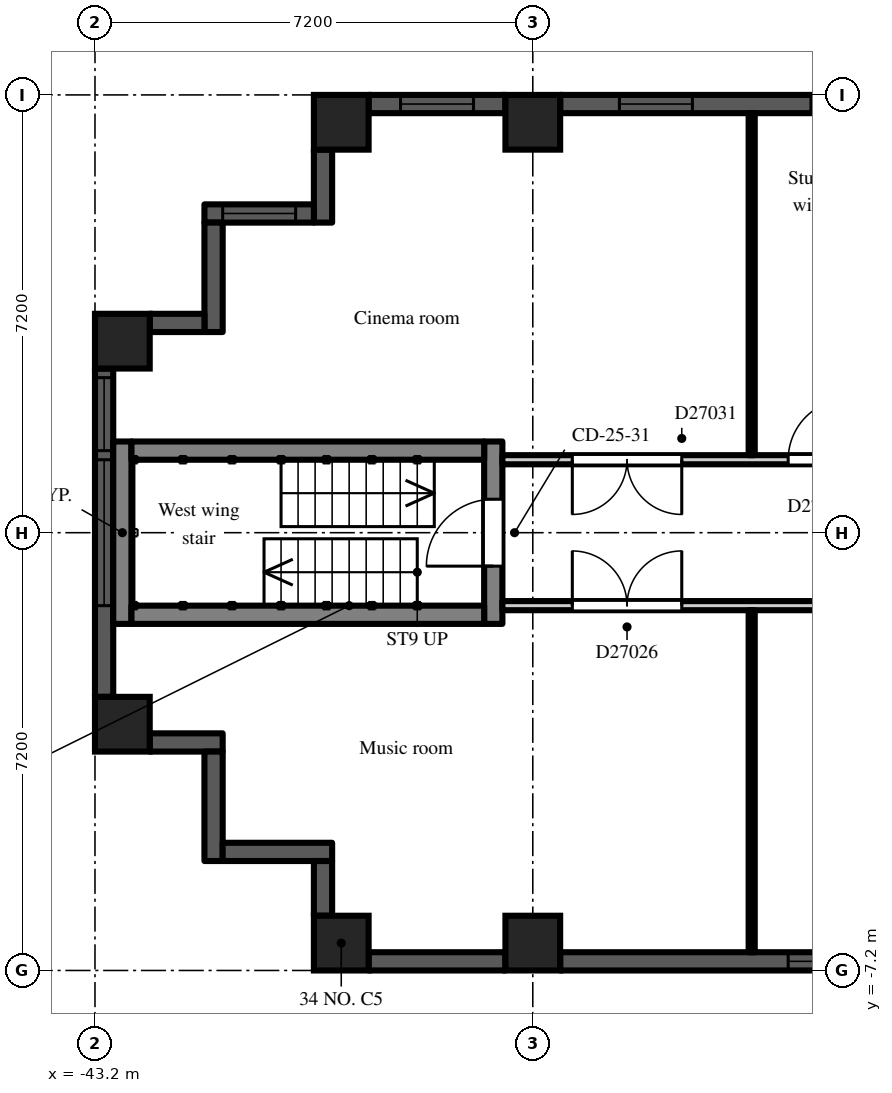
"""IFC4 building model, lengths in metres.
Left out: names, types, materials, properties, quantities, classifications, styles, units other than length and angle.
Written with IfcOpenShell. Run it as: python <this file> out.ifc"""

import sys

from ifc_helpers import new_model, si_unit, direction, frame, frame_2d, origin, origin_2d, place, context, subcontext, project, spatial, rectangle, extrude, element, fill, save


model = new_model("IFC4")
c1 = context("Model", 3, precision=1e-05, world=origin(), true_north=direction((0.0, 1.0)))
c2 = subcontext(c1, "Body", "Model", "MODEL_VIEW")
j1 = project(units=[si_unit("LENGTHUNIT", "METRE"), si_unit("PLANEANGLEUNIT", "RADIAN")], contexts=[c1])
p1 = place(None, origin())
s1 = spatial("IfcSite", under=j1, at=p1, CompositionType="ELEMENT")
p2 = place(p1, origin())
s2 = spatial("IfcBuilding", under=s1, at=p2, CompositionType="ELEMENT")
p3 = place(p2, frame((0.0, 0.0, 191.7)))
s3 = spatial("IfcBuildingStorey", under=s2, at=p3, CompositionType="ELEMENT", Elevation=191.7)
for number, where, z_axis, x_axis in (
    (1, (-42.75, -3.15, 0.0), (0.0, 0.0, 1.0), (1.0, 0.0, 0.0)),
    (2, (-42.75, 3.15, 0.0), (0.0, 0.0, 1.0), (1.0, 0.0, 0.0)),
    (3, (-39.15, -6.75, 0.0), (0.0, 0.0, 1.0), (1.0, 0.0, 0.0)),
    (4, (-39.15, 6.75, 0.0), (0.0, 0.0, 1.0), (1.0, 0.0, 0.0)),
    (5, (-36.0, -6.75, 0.0), (0.0, 0.0, 1.0), (1.0, 0.0, 0.0)),
    (6, (-36.0, 6.75, 0.0), (0.0, 0.0, 1.0), (1.0, 0.0, 0.0)),
):
    element("IfcColumn", number, at=place(p3, frame(where, z_axis=z_axis, x_axis=x_axis)), inside=s3, PredefinedType="COLUMN", context=c2, shape_type="SweptSolid", body=[
        extrude(rectangle(XDim=0.9, YDim=0.9, at=origin_2d()), origin(), (0.0, 0.0, 1.0), 3.0),
    ])
p4 = place(p3, frame((-29.25, 7.05, 0.0), z_axis=(0.0, 0.0, 1.0), x_axis=(-1.0, 0.0, 0.0)))
e7 = element("IfcWall", 7, at=p4, inside=s3, PredefinedType="SOLIDWALL", context=c2, shape_type="SweptSolid", body=[
    extrude(rectangle(XDim=6.3, YDim=0.3, at=frame_2d((3.15, 0.0))), origin(), (0.0, 0.0, 1.0), 2.3),
])
p5 = place(p4, frame((0.975, 0.0, 0.2)))
e8 = element("IfcOpeningElement", 8, at=p5, cuts=e7, PredefinedType="OPENING", context=c2, shape_type="SweptSolid", body=[
    extrude(rectangle(XDim=1.2, YDim=1.85, at=frame_2d((0.6, 0.925))), frame((0.0, 0.16, 0.0), z_axis=(0.0, -1.0, 0.0), x_axis=(1.0, 0.0, 0.0)), (0.0, 0.0, 1.0), 0.32),
])
p6 = place(p4, frame((4.125, 0.0, 0.2)))
e9 = element("IfcOpeningElement", 9, at=p6, cuts=e7, PredefinedType="OPENING", context=c2, shape_type="SweptSolid", body=[
    extrude(rectangle(XDim=1.2, YDim=1.85, at=frame_2d((0.6, 0.925))), frame((0.0, 0.16, 0.0), z_axis=(0.0, -1.0, 0.0), x_axis=(1.0, 0.0, 0.0)), (0.0, 0.0, 1.0), 0.32),
])
p7 = place(p3, frame((-36.45, 7.05, 0.0), z_axis=(0.0, 0.0, 1.0), x_axis=(-1.0, 0.0, 0.0)))
e10 = element("IfcWall", 10, at=p7, inside=s3, PredefinedType="SOLIDWALL", context=c2, shape_type="SweptSolid", body=[
    extrude(rectangle(XDim=2.25, YDim=0.3, at=frame_2d((1.125, 0.0))), origin(), (0.0, 0.0, 1.0), 2.3),
])
p8 = place(p7, frame((0.525, 0.0, 0.2)))
e11 = element("IfcOpeningElement", 11, at=p8, cuts=e10, PredefinedType="OPENING", context=c2, shape_type="SweptSolid", body=[
    extrude(rectangle(XDim=1.2, YDim=1.85, at=frame_2d((0.6, 0.925))), frame((0.0, 0.16, 0.0), z_axis=(0.0, -1.0, 0.0), x_axis=(1.0, 0.0, 0.0)), (0.0, 0.0, 1.0), 0.32),
])
p9 = place(p3, frame((-39.45, 6.3, 0.0), z_axis=(0.0, 0.0, 1.0), x_axis=(0.0, -1.0, 0.0)))
e12 = element("IfcWall", 12, at=p9, inside=s3, PredefinedType="SOLIDWALL", context=c2, shape_type="SweptSolid", body=[
    extrude(rectangle(XDim=1.2, YDim=0.3, at=frame_2d((0.6, 0.0))), origin(), (0.0, 0.0, 1.0), 2.55),
])
p10 = place(p3, frame((-39.6, 5.25, 0.0), z_axis=(0.0, 0.0, 1.0), x_axis=(-1.0, 0.0, 0.0)))
e13 = element("IfcWall", 13, at=p10, inside=s3, PredefinedType="SOLIDWALL", context=c2, shape_type="SweptSolid", body=[
    extrude(rectangle(XDim=1.8, YDim=0.3, at=frame_2d((0.9, 0.0))), origin(), (0.0, 0.0, 1.0), 2.55),
])
p11 = place(p10, frame((0.3, 0.0, 0.2)))
e14 = element("IfcOpeningElement", 14, at=p11, cuts=e13, PredefinedType="OPENING", context=c2, shape_type="SweptSolid", body=[
    extrude(rectangle(XDim=1.2, YDim=1.85, at=frame_2d((0.6, 0.925))), frame((0.0, 0.16, 0.0), z_axis=(0.0, -1.0, 0.0), x_axis=(1.0, 0.0, 0.0)), (0.0, 0.0, 1.0), 0.32),
])
p12 = place(p3, frame((-41.25, 5.1, 0.0), z_axis=(0.0, 0.0, 1.0), x_axis=(0.0, -1.0, 0.0)))
e15 = element("IfcWall", 15, at=p12, inside=s3, PredefinedType="SOLIDWALL", context=c2, shape_type="SweptSolid", body=[
    extrude(rectangle(XDim=1.8, YDim=0.3, at=frame_2d((0.9, 0.0))), origin(), (0.0, 0.0, 1.0), 2.55),
])
p13 = place(p3, frame((-41.4, 3.45, 0.0), z_axis=(0.0, 0.0, 1.0), x_axis=(-1.0, 0.0, 0.0)))
e16 = element("IfcWall", 16, at=p13, inside=s3, PredefinedType="SOLIDWALL", context=c2, shape_type="SweptSolid", body=[
    extrude(rectangle(XDim=0.9, YDim=0.3, at=frame_2d((0.45, 0.0))), origin(), (0.0, 0.0, 1.0), 2.55),
])
p14 = place(p3, frame((-43.05, 2.7, 0.0), z_axis=(0.0, 0.0, 1.0), x_axis=(0.0, -1.0, 0.0)))
e17 = element("IfcWall", 17, at=p14, inside=s3, PredefinedType="SOLIDWALL", context=c2, shape_type="SweptSolid", body=[
    extrude(rectangle(XDim=5.4, YDim=0.3, at=frame_2d((2.7, 0.0))), origin(), (0.0, 0.0, 1.0), 2.3),
])
p15 = place(p14, frame((1.5, 0.0, 0.2)))
e18 = element("IfcOpeningElement", 18, at=p15, cuts=e17, PredefinedType="OPENING", context=c2, shape_type="SweptSolid", body=[
    extrude(rectangle(XDim=2.4, YDim=1.85, at=frame_2d((1.2, 0.925))), frame((0.0, 0.16, 0.0), z_axis=(0.0, -1.0, 0.0), x_axis=(1.0, 0.0, 0.0)), (0.0, 0.0, 1.0), 0.32),
])
p16 = place(p14, frame((0.15, 0.0, 0.2)))
e19 = element("IfcOpeningElement", 19, at=p16, cuts=e17, PredefinedType="OPENING", context=c2, shape_type="SweptSolid", body=[
    extrude(rectangle(XDim=1.2, YDim=1.85, at=frame_2d((0.6, 0.925))), frame((0.0, 0.16, 0.0), z_axis=(0.0, -1.0, 0.0), x_axis=(1.0, 0.0, 0.0)), (0.0, 0.0, 1.0), 0.32),
])
p17 = place(p3, frame((-42.3, -3.45, 0.0), z_axis=(0.0, 0.0, 1.0), x_axis=(1.0, 0.0, 0.0)))
e20 = element("IfcWall", 20, at=p17, inside=s3, PredefinedType="SOLIDWALL", context=c2, shape_type="SweptSolid", body=[
    extrude(rectangle(XDim=1.2, YDim=0.3, at=frame_2d((0.6, 0.0))), origin(), (0.0, 0.0, 1.0), 2.55),
])
p18 = place(p3, frame((-41.25, -3.6, 0.0), z_axis=(0.0, 0.0, 1.0), x_axis=(0.0, -1.0, 0.0)))
e21 = element("IfcWall", 21, at=p18, inside=s3, PredefinedType="SOLIDWALL", context=c2, shape_type="SweptSolid", body=[
    extrude(rectangle(XDim=1.8, YDim=0.3, at=frame_2d((0.9, 0.0))), origin(), (0.0, 0.0, 1.0), 2.55),
])
p19 = place(p3, frame((-41.1, -5.25, 0.0), z_axis=(0.0, 0.0, 1.0), x_axis=(1.0, 0.0, 0.0)))
e22 = element("IfcWall", 22, at=p19, inside=s3, PredefinedType="SOLIDWALL", context=c2, shape_type="SweptSolid", body=[
    extrude(rectangle(XDim=1.8, YDim=0.3, at=frame_2d((0.9, 0.0))), origin(), (0.0, 0.0, 1.0), 2.55),
])
p20 = place(p3, frame((-39.45, -5.4, 0.0), z_axis=(0.0, 0.0, 1.0), x_axis=(0.0, -1.0, 0.0)))
e23 = element("IfcWall", 23, at=p20, inside=s3, PredefinedType="SOLIDWALL", context=c2, shape_type="SweptSolid", body=[
    extrude(rectangle(XDim=0.9, YDim=0.3, at=frame_2d((0.45, 0.0))), origin(), (0.0, 0.0, 1.0), 2.55),
])
p21 = place(p3, frame((-38.7, -7.05, 0.0), z_axis=(0.0, 0.0, 1.0), x_axis=(1.0, 0.0, 0.0)))
e24 = element("IfcWall", 24, at=p21, inside=s3, PredefinedType="SOLIDWALL", context=c2, shape_type="SweptSolid", body=[
    extrude(rectangle(XDim=2.25, YDim=0.3, at=frame_2d((1.125, 0.0))), origin(), (0.0, 0.0, 1.0), 2.3),
])
p22 = place(p3, frame((-35.55, -7.05, 0.0), z_axis=(0.0, 0.0, 1.0), x_axis=(1.0, 0.0, 0.0)))
e25 = element("IfcWall", 25, at=p22, inside=s3, PredefinedType="SOLIDWALL", context=c2, shape_type="SweptSolid", body=[
    extrude(rectangle(XDim=6.3, YDim=0.3, at=frame_2d((3.15, 0.0))), origin(), (0.0, 0.0, 1.0), 2.3),
])
p23 = place(p22, frame((3.75, 0.0, 0.2)))
e26 = element("IfcOpeningElement", 26, at=p23, cuts=e25, PredefinedType="OPENING", context=c2, shape_type="SweptSolid", body=[
    extrude(rectangle(XDim=2.4, YDim=1.85, at=frame_2d((1.2, 0.925))), frame((0.0, 0.16, 0.0), z_axis=(0.0, -1.0, 0.0), x_axis=(1.0, 0.0, 0.0)), (0.0, 0.0, 1.0), 0.32),
])
p24 = place(p3, frame((-36.65, -1.5, 0.0), z_axis=(0.0, 0.0, 1.0), x_axis=(0.0, 1.0, 0.0)))
e27 = element("IfcWall", 27, at=p24, inside=s3, PredefinedType="SHEAR", context=c2, shape_type="SweptSolid", body=[
    extrude(rectangle(XDim=3.0, YDim=0.3, at=frame_2d((1.5, 0.0))), origin(), (0.0, 0.0, 1.0), 2.55),
])
p25 = place(p24, frame((0.95, 0.0, 0.0)))
e28 = element("IfcOpeningElement", 28, at=p25, cuts=e27, PredefinedType="OPENING", context=c2, shape_type="SweptSolid", body=[
    extrude(rectangle(XDim=1.1, YDim=2.1, at=frame_2d((0.55, 1.05))), frame((0.0, 0.16, 0.0), z_axis=(0.0, -1.0, 0.0), x_axis=(1.0, 0.0, 0.0)), (0.0, 0.0, 1.0), 0.32),
])
p26 = place(p3, frame((-42.75, -1.5, 0.0), z_axis=(0.0, 0.0, 1.0), x_axis=(0.0, 1.0, 0.0)))
e29 = element("IfcWall", 29, at=p26, inside=s3, PredefinedType="SHEAR", context=c2, shape_type="SweptSolid", body=[
    extrude(rectangle(XDim=3.0, YDim=0.3, at=frame_2d((1.5, 0.0))), origin(), (0.0, 0.0, 1.0), 2.55),
])
for number, where, z_axis, x_axis in (
    (30, (-36.8, -1.35, 0.0), (0.0, 0.0, 1.0), (-1.0, 0.0, 0.0)),
    (31, (-36.8, 1.35, 0.0), (0.0, 0.0, 1.0), (-1.0, 0.0, 0.0)),
):
    element("IfcWall", number, at=place(p3, frame(where, z_axis=z_axis, x_axis=x_axis)), inside=s3, PredefinedType="SHEAR", context=c2, shape_type="SweptSolid", body=[
        extrude(rectangle(XDim=5.8, YDim=0.3, at=frame_2d((2.9, 0.0))), origin(), (0.0, 0.0, 1.0), 2.55),
    ])
p27 = place(p3, frame((-36.5, -1.2, 0.0), z_axis=(0.0, 0.0, 1.0), x_axis=(1.0, 0.0, 0.0)))
e32 = element("IfcWall", 32, at=p27, inside=s3, PredefinedType="PARTITIONING", context=c2, shape_type="SweptSolid", body=[
    extrude(rectangle(XDim=14.9, YDim=0.15, at=frame_2d((7.45, 0.0))), origin(), (0.0, 0.0, 1.0), 2.55),
])
p28 = place(p27, frame((12.65, 0.0, 0.0)))
e33 = element("IfcOpeningElement", 33, at=p28, cuts=e32, PredefinedType="OPENING", context=c2, shape_type="SweptSolid", body=[
    extrude(rectangle(XDim=0.9, YDim=2.1, at=frame_2d((0.45, 1.05))), frame((0.0, 0.085, 0.0), z_axis=(0.0, -1.0, 0.0), x_axis=(1.0, 0.0, 0.0)), (0.0, 0.0, 1.0), 0.17),
])
p29 = place(p27, frame((9.05, 0.0, 0.0)))
e34 = element("IfcOpeningElement", 34, at=p29, cuts=e32, PredefinedType="OPENING", context=c2, shape_type="SweptSolid", body=[
    extrude(rectangle(XDim=0.9, YDim=2.1, at=frame_2d((0.45, 1.05))), frame((0.0, 0.085, 0.0), z_axis=(0.0, -1.0, 0.0), x_axis=(1.0, 0.0, 0.0)), (0.0, 0.0, 1.0), 0.17),
])
p30 = place(p27, frame((5.45, 0.0, 0.0)))
e35 = element("IfcOpeningElement", 35, at=p30, cuts=e32, PredefinedType="OPENING", context=c2, shape_type="SweptSolid", body=[
    extrude(rectangle(XDim=0.9, YDim=2.1, at=frame_2d((0.45, 1.05))), frame((0.0, 0.085, 0.0), z_axis=(0.0, -1.0, 0.0), x_axis=(1.0, 0.0, 0.0)), (0.0, 0.0, 1.0), 0.17),
])
p31 = place(p27, frame((1.15, 0.0, 0.0)))
e36 = element("IfcOpeningElement", 36, at=p31, cuts=e32, PredefinedType="OPENING", context=c2, shape_type="SweptSolid", body=[
    extrude(rectangle(XDim=1.8, YDim=2.1, at=frame_2d((0.9, 1.05))), frame((0.0, 0.085, 0.0), z_axis=(0.0, -1.0, 0.0), x_axis=(1.0, 0.0, 0.0)), (0.0, 0.0, 1.0), 0.17),
])
p32 = place(p3, frame((-36.5, 1.2, 0.0), z_axis=(0.0, 0.0, 1.0), x_axis=(1.0, 0.0, 0.0)))
e37 = element("IfcWall", 37, at=p32, inside=s3, PredefinedType="PARTITIONING", context=c2, shape_type="SweptSolid", body=[
    extrude(rectangle(XDim=14.9, YDim=0.15, at=frame_2d((7.45, 0.0))), origin(), (0.0, 0.0, 1.0), 2.55),
])
p33 = place(p32, frame((10.1, 0.0, 0.0)))
e38 = element("IfcOpeningElement", 38, at=p33, cuts=e37, PredefinedType="OPENING", context=c2, shape_type="SweptSolid", body=[
    extrude(rectangle(XDim=1.0, YDim=2.1, at=frame_2d((0.5, 1.05))), frame((0.0, 0.085, 0.0), z_axis=(0.0, -1.0, 0.0), x_axis=(1.0, 0.0, 0.0)), (0.0, 0.0, 1.0), 0.17),
])
p34 = place(p32, frame((4.7, 0.0, 0.0)))
e39 = element("IfcOpeningElement", 39, at=p34, cuts=e37, PredefinedType="OPENING", context=c2, shape_type="SweptSolid", body=[
    extrude(rectangle(XDim=1.0, YDim=2.1, at=frame_2d((0.5, 1.05))), frame((0.0, 0.085, 0.0), z_axis=(0.0, -1.0, 0.0), x_axis=(1.0, 0.0, 0.0)), (0.0, 0.0, 1.0), 0.17),
])
p35 = place(p32, frame((1.15, 0.0, 0.0)))
e40 = element("IfcOpeningElement", 40, at=p35, cuts=e37, PredefinedType="OPENING", context=c2, shape_type="SweptSolid", body=[
    extrude(rectangle(XDim=1.8, YDim=2.1, at=frame_2d((0.9, 1.05))), frame((0.0, 0.085, 0.0), z_axis=(0.0, -1.0, 0.0), x_axis=(1.0, 0.0, 0.0)), (0.0, 0.0, 1.0), 0.17),
])
for number, where, z_axis, x_axis in (
    (41, (-32.4, -6.9, 0.0), (0.0, 0.0, 1.0), (0.0, 1.0, 0.0)),
    (42, (-32.4, 1.275, 0.0), (0.0, 0.0, 1.0), (0.0, 1.0, 0.0)),
):
    element("IfcWall", number, at=place(p3, frame(where, z_axis=z_axis, x_axis=x_axis)), inside=s3, PredefinedType="PARTITIONING", context=c2, shape_type="SweptSolid", body=[
        extrude(rectangle(XDim=5.625, YDim=0.1, at=frame_2d((2.812, 0.0))), origin(), (0.0, 0.0, 1.0), 2.55),
    ])
p36 = place(p5, origin())
e43 = element("IfcWindow", 43, at=p36, inside=s3, PartitioningType="SINGLE_PANEL", PredefinedType="WINDOW", context=c2, shape_type="SweptSolid", body=[
    extrude(rectangle(XDim=1.2, YDim=1.85, at=frame_2d((0.6, 0.925))), frame((0.0, 0.03, 0.0), z_axis=(0.0, -1.0, 0.0), x_axis=(1.0, 0.0, 0.0)), (0.0, 0.0, 1.0), 0.06),
])
fill(e8, e43)
p37 = place(p6, origin())
e44 = element("IfcWindow", 44, at=p37, inside=s3, PartitioningType="SINGLE_PANEL", PredefinedType="WINDOW", context=c2, shape_type="SweptSolid", body=[
    extrude(rectangle(XDim=1.2, YDim=1.85, at=frame_2d((0.6, 0.925))), frame((0.0, 0.03, 0.0), z_axis=(0.0, -1.0, 0.0), x_axis=(1.0, 0.0, 0.0)), (0.0, 0.0, 1.0), 0.06),
])
fill(e9, e44)
p38 = place(p8, origin())
e45 = element("IfcWindow", 45, at=p38, inside=s3, PartitioningType="SINGLE_PANEL", PredefinedType="WINDOW", context=c2, shape_type="SweptSolid", body=[
    extrude(rectangle(XDim=1.2, YDim=1.85, at=frame_2d((0.6, 0.925))), frame((0.0, 0.03, 0.0), z_axis=(0.0, -1.0, 0.0), x_axis=(1.0, 0.0, 0.0)), (0.0, 0.0, 1.0), 0.06),
])
fill(e11, e45)
p39 = place(p11, origin())
e46 = element("IfcWindow", 46, at=p39, inside=s3, PartitioningType="SINGLE_PANEL", PredefinedType="WINDOW", context=c2, shape_type="SweptSolid", body=[
    extrude(rectangle(XDim=1.2, YDim=1.85, at=frame_2d((0.6, 0.925))), frame((0.0, 0.03, 0.0), z_axis=(0.0, -1.0, 0.0), x_axis=(1.0, 0.0, 0.0)), (0.0, 0.0, 1.0), 0.06),
])
fill(e14, e46)
p40 = place(p15, origin())
e47 = element("IfcWindow", 47, at=p40, inside=s3, PartitioningType="SINGLE_PANEL", PredefinedType="WINDOW", context=c2, shape_type="SweptSolid", body=[
    extrude(rectangle(XDim=2.4, YDim=1.85, at=frame_2d((1.2, 0.925))), frame((0.0, 0.03, 0.0), z_axis=(0.0, -1.0, 0.0), x_axis=(1.0, 0.0, 0.0)), (0.0, 0.0, 1.0), 0.06),
])
fill(e18, e47)
p41 = place(p16, origin())
e48 = element("IfcWindow", 48, at=p41, inside=s3, PartitioningType="SINGLE_PANEL", PredefinedType="WINDOW", context=c2, shape_type="SweptSolid", body=[
    extrude(rectangle(XDim=1.2, YDim=1.85, at=frame_2d((0.6, 0.925))), frame((0.0, 0.03, 0.0), z_axis=(0.0, -1.0, 0.0), x_axis=(1.0, 0.0, 0.0)), (0.0, 0.0, 1.0), 0.06),
])
fill(e19, e48)
p42 = place(p23, origin())
e49 = element("IfcWindow", 49, at=p42, inside=s3, PartitioningType="SINGLE_PANEL", PredefinedType="WINDOW", context=c2, shape_type="SweptSolid", body=[
    extrude(rectangle(XDim=2.4, YDim=1.85, at=frame_2d((1.2, 0.925))), frame((0.0, 0.03, 0.0), z_axis=(0.0, -1.0, 0.0), x_axis=(1.0, 0.0, 0.0)), (0.0, 0.0, 1.0), 0.06),
])
fill(e26, e49)
p43 = place(p25, origin())
e50 = element("IfcDoor", 50, at=p43, inside=s3, OperationType="SINGLE_SWING_LEFT", PredefinedType="DOOR", context=c2, shape_type="SweptSolid", body=[
    extrude(rectangle(XDim=1.1, YDim=2.1, at=frame_2d((0.55, 1.05))), frame((0.0, 0.025, 0.0), z_axis=(0.0, -1.0, 0.0), x_axis=(1.0, 0.0, 0.0)), (0.0, 0.0, 1.0), 0.05),
])
fill(e28, e50)
p44 = place(p31, origin())
e51 = element("IfcDoor", 51, at=p44, inside=s3, OperationType="DOUBLE_DOOR_DOUBLE_SWING", PredefinedType="DOOR", context=c2, shape_type="SweptSolid", body=[
    extrude(rectangle(XDim=1.8, YDim=2.1, at=frame_2d((0.9, 1.05))), frame((0.0, 0.025, 0.0), z_axis=(0.0, -1.0, 0.0), x_axis=(1.0, 0.0, 0.0)), (0.0, 0.0, 1.0), 0.05),
])
fill(e36, e51)
p45 = place(p34, origin())
e52 = element("IfcDoor", 52, at=p45, inside=s3, OperationType="SINGLE_SWING_RIGHT", PredefinedType="DOOR", context=c2, shape_type="SweptSolid", body=[
    extrude(rectangle(XDim=1.0, YDim=2.1, at=frame_2d((0.5, 1.05))), frame((0.0, 0.025, 0.0), z_axis=(0.0, -1.0, 0.0), x_axis=(1.0, 0.0, 0.0)), (0.0, 0.0, 1.0), 0.05),
])
fill(e39, e52)
p46 = place(p35, frame((1.8, 0.0, 0.0), z_axis=(0.0, 0.0, 1.0), x_axis=(-1.0, 0.0, 0.0)))
e53 = element("IfcDoor", 53, at=p46, inside=s3, OperationType="DOUBLE_DOOR_DOUBLE_SWING", PredefinedType="DOOR", context=c2, shape_type="SweptSolid", body=[
    extrude(rectangle(XDim=1.8, YDim=2.1, at=frame_2d((0.9, 1.05))), frame((0.0, 0.025, 0.0), z_axis=(0.0, -1.0, 0.0), x_axis=(1.0, 0.0, 0.0)), (0.0, 0.0, 1.0), 0.05),
])
fill(e40, e53)
save(model, sys.argv[1])
